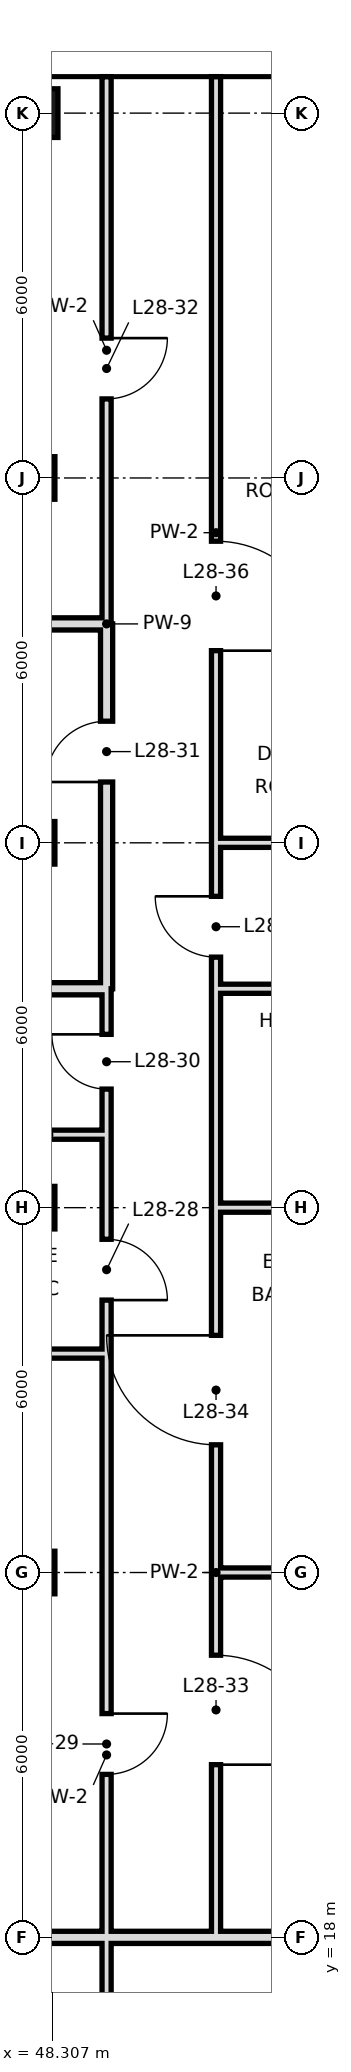
"""IFC4 building model, lengths in metres.
Left out: names, types, materials, properties, quantities, classifications, styles, units other than length and angle.
Written with IfcOpenShell. Run it as: python <this file> out.ifc"""

import sys

from ifc_helpers import new_model, si_unit, direction, frame, frame_2d, origin, origin_2d, place, context, subcontext, project, spatial, rectangle, hollow_rectangle, extrude, element, fill, save


model = new_model("IFC4")
c1 = context("Model", 3, precision=1e-05, world=origin(), true_north=direction((0.0, 1.0)))
c2 = subcontext(c1, "Body", "Model", "MODEL_VIEW")
j1 = project(units=[si_unit("LENGTHUNIT", "METRE"), si_unit("PLANEANGLEUNIT", "RADIAN")], contexts=[c1])
p1 = place(None, origin())
s1 = spatial("IfcSite", under=j1, at=p1, CompositionType="ELEMENT")
p2 = place(p1, origin())
s2 = spatial("IfcBuilding", under=s1, at=p2, CompositionType="ELEMENT")
p3 = place(p2, frame((0.0, 0.0, 126.8)))
s3 = spatial("IfcBuildingStorey", under=s2, at=p3, CompositionType="ELEMENT", Elevation=126.8)
for number, where, z_axis, x_axis in (
    (1, (48.0, 24.0, 0.0), (0.0, 0.0, 1.0), (1.0, 0.0, 0.0)),
    (2, (48.0, 30.0, 0.0), (0.0, 0.0, 1.0), (1.0, 0.0, 0.0)),
    (3, (48.0, 36.0, 0.0), (0.0, 0.0, 1.0), (1.0, 0.0, 0.0)),
    (4, (48.0, 42.0, 0.0), (0.0, 0.0, 1.0), (1.0, 0.0, 0.0)),
):
    element("IfcColumn", number, at=place(p3, frame(where, z_axis=z_axis, x_axis=x_axis)), inside=s3, PredefinedType="COLUMN", context=c2, shape_type="SweptSolid", body=[
        extrude(hollow_rectangle(XDim=0.7, YDim=0.7, WallThickness=0.036, at=origin_2d()), origin(), (0.0, 0.0, 1.0), 3.6),
    ])
p4 = place(p3, frame((48.0, 48.0, 0.0), z_axis=(0.0, 0.0, 1.0), x_axis=(1.0, 0.0, 0.0)))
e5 = element("IfcColumn", 5, at=p4, inside=s3, PredefinedType="COLUMN", context=c2, shape_type="SweptSolid", body=[
    extrude(hollow_rectangle(XDim=0.8, YDim=0.8, WallThickness=0.04, at=origin_2d()), origin(), (0.0, 0.0, 1.0), 3.6),
])
p5 = place(p3, frame((49.2, 33.6, 0.0), z_axis=(0.0, 0.0, 1.0), x_axis=(0.0, 1.0, 0.0)))
e6 = element("IfcWall", 6, at=p5, inside=s3, PredefinedType="SOLIDWALL", context=c2, shape_type="SweptSolid", body=[
    extrude(rectangle(XDim=6.0, YDim=0.2, at=frame_2d((3.0, 0.0))), origin(), (0.0, 0.0, 1.0), 2.72),
])
p6 = place(p5, frame((3.4, 0.0, 0.0)))
e7 = element("IfcOpeningElement", 7, at=p6, cuts=e6, PredefinedType="OPENING", context=c2, shape_type="SweptSolid", body=[
    extrude(rectangle(XDim=1.0, YDim=2.4, at=frame_2d((0.5, 1.2))), frame((0.0, 0.11, 0.0), z_axis=(0.0, -1.0, 0.0), x_axis=(1.0, 0.0, 0.0)), (0.0, 0.0, 1.0), 0.22),
])
p7 = place(p3, frame((49.2, 10.8, 0.0), z_axis=(0.0, 0.0, 1.0), x_axis=(0.0, 1.0, 0.0)))
e8 = element("IfcWall", 8, at=p7, inside=s3, PredefinedType="PARTITIONING", context=c2, shape_type="SweptSolid", body=[
    extrude(rectangle(XDim=20.4, YDim=0.15, at=frame_2d((10.2, 0.0))), origin(), (0.0, 0.0, 1.0), 3.42),
])
p8 = place(p7, frame((17.68, 0.0, 0.0)))
e9 = element("IfcOpeningElement", 9, at=p8, cuts=e8, PredefinedType="OPENING", context=c2, shape_type="SweptSolid", body=[
    extrude(rectangle(XDim=1.0, YDim=2.4, at=frame_2d((0.5, 1.2))), frame((0.0, 0.085, 0.0), z_axis=(0.0, -1.0, 0.0), x_axis=(1.0, 0.0, 0.0)), (0.0, 0.0, 1.0), 0.17),
])
p9 = place(p7, frame((9.88, 0.0, 0.0)))
e10 = element("IfcOpeningElement", 10, at=p9, cuts=e8, PredefinedType="OPENING", context=c2, shape_type="SweptSolid", body=[
    extrude(rectangle(XDim=1.0, YDim=2.4, at=frame_2d((0.5, 1.2))), frame((0.0, 0.085, 0.0), z_axis=(0.0, -1.0, 0.0), x_axis=(1.0, 0.0, 0.0)), (0.0, 0.0, 1.0), 0.17),
])
p10 = place(p3, frame((49.2, 39.6, 0.0), z_axis=(0.0, 0.0, 1.0), x_axis=(0.0, 1.0, 0.0)))
e11 = element("IfcWall", 11, at=p10, inside=s3, PredefinedType="PARTITIONING", context=c2, shape_type="SweptSolid", body=[
    extrude(rectangle(XDim=9.0, YDim=0.15, at=frame_2d((4.5, 0.0))), origin(), (0.0, 0.0, 1.0), 3.42),
])
p11 = place(p10, frame((3.7, 0.0, 0.0)))
e12 = element("IfcOpeningElement", 12, at=p11, cuts=e11, PredefinedType="OPENING", context=c2, shape_type="SweptSolid", body=[
    extrude(rectangle(XDim=1.0, YDim=2.4, at=frame_2d((0.5, 1.2))), frame((0.0, 0.085, 0.0), z_axis=(0.0, -1.0, 0.0), x_axis=(1.0, 0.0, 0.0)), (0.0, 0.0, 1.0), 0.17),
])
p12 = place(p3, frame((49.2, 31.2, 0.0), z_axis=(0.0, 0.0, 1.0), x_axis=(0.0, 1.0, 0.0)))
e13 = element("IfcWall", 13, at=p12, inside=s3, PredefinedType="PARTITIONING", context=c2, shape_type="SweptSolid", body=[
    extrude(rectangle(XDim=2.4, YDim=0.15, at=frame_2d((1.2, 0.0))), origin(), (0.0, 0.0, 1.0), 3.42),
])
p13 = place(p12, frame((0.75, 0.0, 0.0)))
e14 = element("IfcOpeningElement", 14, at=p13, cuts=e13, PredefinedType="OPENING", context=c2, shape_type="SweptSolid", body=[
    extrude(rectangle(XDim=0.9, YDim=2.4, at=frame_2d((0.45, 1.2))), frame((0.0, 0.085, 0.0), z_axis=(0.0, -1.0, 0.0), x_axis=(1.0, 0.0, 0.0)), (0.0, 0.0, 1.0), 0.17),
])
p14 = place(p3, frame((51.0, 18.0, 0.0), z_axis=(0.0, 0.0, 1.0), x_axis=(0.0, 1.0, 0.0)))
e15 = element("IfcWall", 15, at=p14, inside=s3, PredefinedType="PARTITIONING", context=c2, shape_type="SweptSolid", body=[
    extrude(rectangle(XDim=12.0, YDim=0.15, at=frame_2d((6.0, 0.0))), origin(), (0.0, 0.0, 1.0), 3.42),
])
p15 = place(p14, frame((2.84, 0.0, 0.0)))
e16 = element("IfcOpeningElement", 16, at=p15, cuts=e15, PredefinedType="OPENING", context=c2, shape_type="SweptSolid", body=[
    extrude(rectangle(XDim=1.8, YDim=2.4, at=frame_2d((0.9, 1.2))), frame((0.0, 0.085, 0.0), z_axis=(0.0, -1.0, 0.0), x_axis=(1.0, 0.0, 0.0)), (0.0, 0.0, 1.0), 0.17),
])
p16 = place(p14, frame((8.1, 0.0, 0.0)))
e17 = element("IfcOpeningElement", 17, at=p16, cuts=e15, PredefinedType="OPENING", context=c2, shape_type="SweptSolid", body=[
    extrude(rectangle(XDim=1.8, YDim=2.4, at=frame_2d((0.9, 1.2))), frame((0.0, 0.085, 0.0), z_axis=(0.0, -1.0, 0.0), x_axis=(1.0, 0.0, 0.0)), (0.0, 0.0, 1.0), 0.17),
])
p17 = place(p3, frame((51.0, 33.6, 0.0), z_axis=(0.0, 0.0, 1.0), x_axis=(0.0, 1.0, 0.0)))
e18 = element("IfcWall", 18, at=p17, inside=s3, PredefinedType="PARTITIONING", context=c2, shape_type="SweptSolid", body=[
    extrude(rectangle(XDim=15.0, YDim=0.15, at=frame_2d((7.5, 0.0))), origin(), (0.0, 0.0, 1.0), 3.42),
])
p18 = place(p17, frame((0.52, 0.0, 0.0)))
e19 = element("IfcOpeningElement", 19, at=p18, cuts=e18, PredefinedType="OPENING", context=c2, shape_type="SweptSolid", body=[
    extrude(rectangle(XDim=1.0, YDim=2.4, at=frame_2d((0.5, 1.2))), frame((0.0, 0.085, 0.0), z_axis=(0.0, -1.0, 0.0), x_axis=(1.0, 0.0, 0.0)), (0.0, 0.0, 1.0), 0.17),
])
p19 = place(p17, frame((5.56, 0.0, 0.0)))
e20 = element("IfcOpeningElement", 20, at=p19, cuts=e18, PredefinedType="OPENING", context=c2, shape_type="SweptSolid", body=[
    extrude(rectangle(XDim=1.8, YDim=2.4, at=frame_2d((0.9, 1.2))), frame((0.0, 0.085, 0.0), z_axis=(0.0, -1.0, 0.0), x_axis=(1.0, 0.0, 0.0)), (0.0, 0.0, 1.0), 0.17),
])
p20 = place(p3, frame((51.0, 30.0, 0.0), z_axis=(0.0, 0.0, 1.0), x_axis=(0.0, 1.0, 0.0)))
e21 = element("IfcWall", 21, at=p20, inside=s3, PredefinedType="PARTITIONING", context=c2, shape_type="SweptSolid", body=[
    extrude(rectangle(XDim=3.6, YDim=0.15, at=frame_2d((1.8, 0.0))), origin(), (0.0, 0.0, 1.0), 3.42),
])
p21 = place(p3, frame((44.9, 18.0, 0.0), z_axis=(0.0, 0.0, 1.0), x_axis=(1.0, 0.0, 0.0)))
e22 = element("IfcWall", 22, at=p21, inside=s3, PredefinedType="SOLIDWALL", context=c2, shape_type="SweptSolid", body=[
    extrude(rectangle(XDim=15.7, YDim=0.2, at=frame_2d((7.85, 0.0))), origin(), (0.0, 0.0, 1.0), 2.72),
])
p22 = place(p3, frame((51.0, 24.0, 0.0), z_axis=(0.0, 0.0, 1.0), x_axis=(1.0, 0.0, 0.0)))
e23 = element("IfcWall", 23, at=p22, inside=s3, PredefinedType="PARTITIONING", context=c2, shape_type="SweptSolid", body=[
    extrude(rectangle(XDim=9.0, YDim=0.15, at=frame_2d((4.5, 0.0))), origin(), (0.0, 0.0, 1.0), 2.72),
])
p23 = place(p3, frame((44.9, 27.6, 0.0), z_axis=(0.0, 0.0, 1.0), x_axis=(1.0, 0.0, 0.0)))
e24 = element("IfcWall", 24, at=p23, inside=s3, PredefinedType="PARTITIONING", context=c2, shape_type="SweptSolid", body=[
    extrude(rectangle(XDim=4.3, YDim=0.15, at=frame_2d((2.15, 0.0))), origin(), (0.0, 0.0, 1.0), 3.42),
])
p24 = place(p3, frame((51.0, 30.0, 0.0), z_axis=(0.0, 0.0, 1.0), x_axis=(1.0, 0.0, 0.0)))
e25 = element("IfcWall", 25, at=p24, inside=s3, PredefinedType="PARTITIONING", context=c2, shape_type="SweptSolid", body=[
    extrude(rectangle(XDim=3.0, YDim=0.15, at=frame_2d((1.5, 0.0))), origin(), (0.0, 0.0, 1.0), 2.72),
])
p25 = place(p3, frame((44.9, 31.2, 0.0), z_axis=(0.0, 0.0, 1.0), x_axis=(1.0, 0.0, 0.0)))
e26 = element("IfcWall", 26, at=p25, inside=s3, PredefinedType="PARTITIONING", context=c2, shape_type="SweptSolid", body=[
    extrude(rectangle(XDim=4.3, YDim=0.15, at=frame_2d((2.15, 0.0))), origin(), (0.0, 0.0, 1.0), 3.42),
])
p26 = place(p3, frame((44.9, 33.6, 0.0), z_axis=(0.0, 0.0, 1.0), x_axis=(1.0, 0.0, 0.0)))
e27 = element("IfcWall", 27, at=p26, inside=s3, PredefinedType="SOLIDWALL", context=c2, shape_type="SweptSolid", body=[
    extrude(rectangle(XDim=4.3, YDim=0.2, at=frame_2d((2.15, 0.0))), origin(), (0.0, 0.0, 1.0), 2.97),
])
p27 = place(p3, frame((51.0, 33.6, 0.0), z_axis=(0.0, 0.0, 1.0), x_axis=(1.0, 0.0, 0.0)))
e28 = element("IfcWall", 28, at=p27, inside=s3, PredefinedType="PARTITIONING", context=c2, shape_type="SweptSolid", body=[
    extrude(rectangle(XDim=3.0, YDim=0.15, at=frame_2d((1.5, 0.0))), origin(), (0.0, 0.0, 1.0), 3.42),
])
p28 = place(p3, frame((51.0, 36.0, 0.0), z_axis=(0.0, 0.0, 1.0), x_axis=(1.0, 0.0, 0.0)))
e29 = element("IfcWall", 29, at=p28, inside=s3, PredefinedType="PARTITIONING", context=c2, shape_type="SweptSolid", body=[
    extrude(rectangle(XDim=9.0, YDim=0.15, at=frame_2d((4.5, 0.0))), origin(), (0.0, 0.0, 1.0), 2.72),
])
p29 = place(p3, frame((44.9, 39.6, 0.0), z_axis=(0.0, 0.0, 1.0), x_axis=(1.0, 0.0, 0.0)))
e30 = element("IfcWall", 30, at=p29, inside=s3, PredefinedType="SOLIDWALL", context=c2, shape_type="SweptSolid", body=[
    extrude(rectangle(XDim=4.3, YDim=0.2, at=frame_2d((2.15, 0.0))), origin(), (0.0, 0.0, 1.0), 2.97),
])
p30 = place(p8, frame((1.0, 0.0, 0.0), z_axis=(0.0, 0.0, 1.0), x_axis=(-1.0, 0.0, 0.0)))
e31 = element("IfcDoor", 31, at=p30, inside=s3, OperationType="SINGLE_SWING_RIGHT", PredefinedType="DOOR", context=c2, shape_type="SweptSolid", body=[
    extrude(rectangle(XDim=1.0, YDim=2.4, at=frame_2d((0.5, 1.2))), frame((0.0, 0.025, 0.0), z_axis=(0.0, -1.0, 0.0), x_axis=(1.0, 0.0, 0.0)), (0.0, 0.0, 1.0), 0.05),
])
fill(e9, e31)
p31 = place(p9, origin())
e32 = element("IfcDoor", 32, at=p31, inside=s3, OperationType="SINGLE_SWING_RIGHT", PredefinedType="DOOR", context=c2, shape_type="SweptSolid", body=[
    extrude(rectangle(XDim=1.0, YDim=2.4, at=frame_2d((0.5, 1.2))), frame((0.0, 0.025, 0.0), z_axis=(0.0, -1.0, 0.0), x_axis=(1.0, 0.0, 0.0)), (0.0, 0.0, 1.0), 0.05),
])
fill(e10, e32)
p32 = place(p13, frame((0.9, 0.0, 0.0), z_axis=(0.0, 0.0, 1.0), x_axis=(-1.0, 0.0, 0.0)))
e33 = element("IfcDoor", 33, at=p32, inside=s3, OperationType="SINGLE_SWING_LEFT", PredefinedType="DOOR", context=c2, shape_type="SweptSolid", body=[
    extrude(rectangle(XDim=0.9, YDim=2.4, at=frame_2d((0.45, 1.2))), frame((0.0, 0.025, 0.0), z_axis=(0.0, -1.0, 0.0), x_axis=(1.0, 0.0, 0.0)), (0.0, 0.0, 1.0), 0.05),
])
fill(e14, e33)
p33 = place(p6, origin())
e34 = element("IfcDoor", 34, at=p33, inside=s3, OperationType="SINGLE_SWING_LEFT", PredefinedType="DOOR", context=c2, shape_type="SweptSolid", body=[
    extrude(rectangle(XDim=1.0, YDim=2.4, at=frame_2d((0.5, 1.2))), frame((0.0, 0.025, 0.0), z_axis=(0.0, -1.0, 0.0), x_axis=(1.0, 0.0, 0.0)), (0.0, 0.0, 1.0), 0.05),
])
fill(e7, e34)
p34 = place(p11, origin())
e35 = element("IfcDoor", 35, at=p34, inside=s3, OperationType="SINGLE_SWING_RIGHT", PredefinedType="DOOR", context=c2, shape_type="SweptSolid", body=[
    extrude(rectangle(XDim=1.0, YDim=2.4, at=frame_2d((0.5, 1.2))), frame((0.0, 0.025, 0.0), z_axis=(0.0, -1.0, 0.0), x_axis=(1.0, 0.0, 0.0)), (0.0, 0.0, 1.0), 0.05),
])
fill(e12, e35)
p35 = place(p15, frame((1.8, 0.0, 0.0), z_axis=(0.0, 0.0, 1.0), x_axis=(-1.0, 0.0, 0.0)))
e36 = element("IfcDoor", 36, at=p35, inside=s3, OperationType="SINGLE_SWING_RIGHT", PredefinedType="DOOR", context=c2, shape_type="SweptSolid", body=[
    extrude(rectangle(XDim=1.8, YDim=2.4, at=frame_2d((0.9, 1.2))), frame((0.0, 0.025, 0.0), z_axis=(0.0, -1.0, 0.0), x_axis=(1.0, 0.0, 0.0)), (0.0, 0.0, 1.0), 0.05),
])
fill(e16, e36)
p36 = place(p16, frame((1.8, 0.0, 0.0), z_axis=(0.0, 0.0, 1.0), x_axis=(-1.0, 0.0, 0.0)))
e37 = element("IfcDoor", 37, at=p36, inside=s3, OperationType="SINGLE_SWING_LEFT", PredefinedType="DOOR", context=c2, shape_type="SweptSolid", body=[
    extrude(rectangle(XDim=1.8, YDim=2.4, at=frame_2d((0.9, 1.2))), frame((0.0, 0.025, 0.0), z_axis=(0.0, -1.0, 0.0), x_axis=(1.0, 0.0, 0.0)), (0.0, 0.0, 1.0), 0.05),
])
fill(e17, e37)
p37 = place(p18, frame((1.0, 0.0, 0.0), z_axis=(0.0, 0.0, 1.0), x_axis=(-1.0, 0.0, 0.0)))
e38 = element("IfcDoor", 38, at=p37, inside=s3, OperationType="SINGLE_SWING_LEFT", PredefinedType="DOOR", context=c2, shape_type="SweptSolid", body=[
    extrude(rectangle(XDim=1.0, YDim=2.4, at=frame_2d((0.5, 1.2))), frame((0.0, 0.025, 0.0), z_axis=(0.0, -1.0, 0.0), x_axis=(1.0, 0.0, 0.0)), (0.0, 0.0, 1.0), 0.05),
])
fill(e19, e38)
p38 = place(p19, frame((1.8, 0.0, 0.0), z_axis=(0.0, 0.0, 1.0), x_axis=(-1.0, 0.0, 0.0)))
e39 = element("IfcDoor", 39, at=p38, inside=s3, OperationType="SINGLE_SWING_RIGHT", PredefinedType="DOOR", context=c2, shape_type="SweptSolid", body=[
    extrude(rectangle(XDim=1.8, YDim=2.4, at=frame_2d((0.9, 1.2))), frame((0.0, 0.025, 0.0), z_axis=(0.0, -1.0, 0.0), x_axis=(1.0, 0.0, 0.0)), (0.0, 0.0, 1.0), 0.05),
])
fill(e20, e39)
save(model, sys.argv[1])
